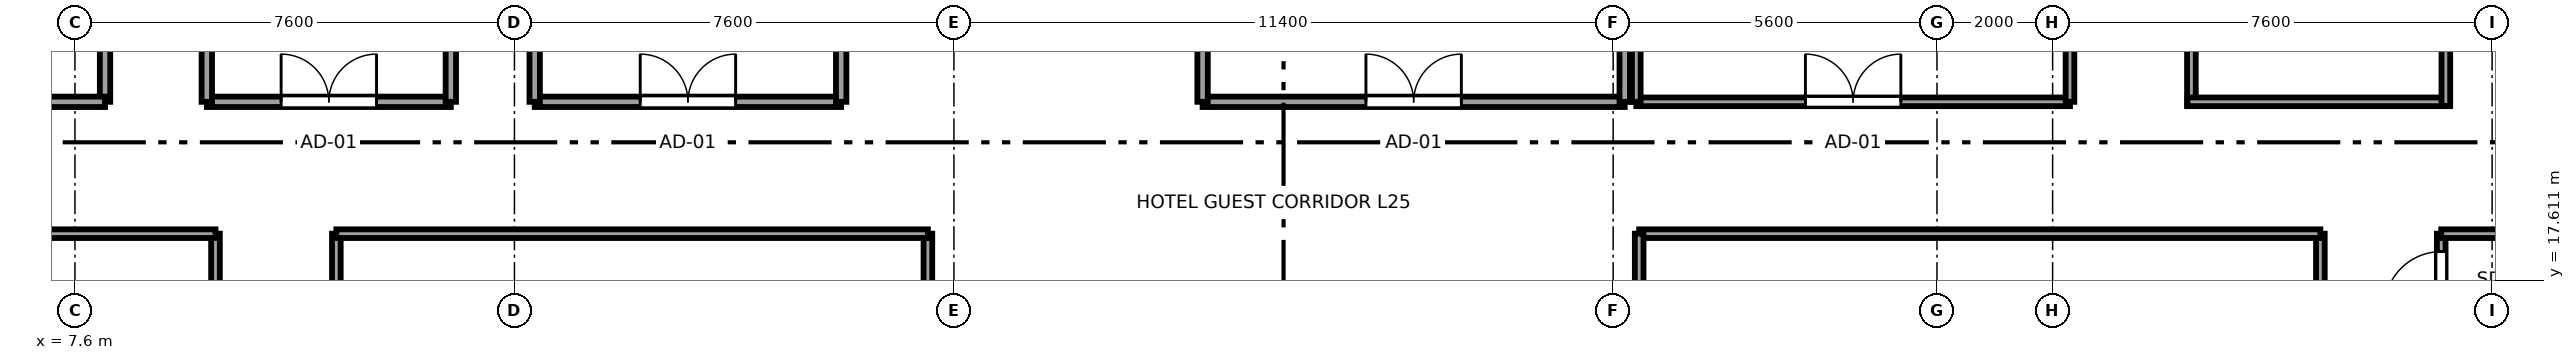
"""IFC4 building model, lengths in metres.
Left out: names, types, materials, properties, quantities, classifications, styles, units other than length and angle.
Written with IfcOpenShell. Run it as: python <this file> out.ifc"""

import sys

from ifc_helpers import new_model, si_unit, direction, frame, frame_2d, origin, place, context, subcontext, project, spatial, rectangle, extrude, source, transform, mapped, element, fill, save


model = new_model("IFC4")
c1 = context("Model", 3, precision=1e-05, world=origin(), true_north=direction((0.0, 1.0)))
c2 = subcontext(c1, "Body", "Model", "MODEL_VIEW")
j1 = project(units=[si_unit("LENGTHUNIT", "METRE"), si_unit("PLANEANGLEUNIT", "RADIAN")], contexts=[c1])
p1 = place(None, origin())
s1 = spatial("IfcSite", under=j1, at=p1, CompositionType="ELEMENT")
p2 = place(p1, origin())
s2 = spatial("IfcBuilding", under=s1, at=p2, CompositionType="ELEMENT")
p3 = place(p2, frame((0.0, 0.0, 100.9)))
s3 = spatial("IfcBuildingStorey", under=s2, at=p3, CompositionType="ELEMENT", Elevation=100.9)
p4 = place(p3, frame((10.03, 11.61, 0.0), z_axis=(0.0, 0.0, 1.0), x_axis=(0.0, 1.0, 0.0)))
e1 = element("IfcWall", 1, at=p4, inside=s3, PredefinedType="PARTITIONING", context=c2, shape_type="SweptSolid", body=[
    extrude(rectangle(XDim=6.81, YDim=0.15, at=frame_2d((3.405, 0.0))), origin(), (0.0, 0.0, 1.0), 3.37),
])
p5 = place(p4, frame((2.895, 0.0, 0.0)))
e2 = element("IfcOpeningElement", 2, at=p5, cuts=e1, PredefinedType="OPENING", context=c2, shape_type="SweptSolid", body=[
    extrude(rectangle(XDim=0.98, YDim=2.12, at=frame_2d((0.49, 1.06))), frame((0.0, 0.085, 0.0), z_axis=(0.0, -1.0, 0.0), x_axis=(1.0, 0.0, 0.0)), (0.0, 0.0, 1.0), 0.17),
])
p6 = place(p3, frame((0.3, 18.42, 0.0), z_axis=(0.0, 0.0, 1.0), x_axis=(1.0, 0.0, 0.0)))
e3 = element("IfcWall", 3, at=p6, inside=s3, PredefinedType="PARTITIONING", context=c2, shape_type="SweptSolid", body=[
    extrude(rectangle(XDim=9.73, YDim=0.15, at=frame_2d((4.865, 0.0))), origin(), (0.0, 0.0, 1.0), 3.37),
])
p7 = place(p3, frame((12.12, 14.81, 0.0), z_axis=(0.0, 0.0, 1.0), x_axis=(0.0, 1.0, 0.0)))
e4 = element("IfcWall", 4, at=p7, inside=s3, PredefinedType="PARTITIONING", context=c2, shape_type="SweptSolid", body=[
    extrude(rectangle(XDim=3.61, YDim=0.15, at=frame_2d((1.805, 0.0))), origin(), (0.0, 0.0, 1.0), 3.37),
])
p8 = place(p7, frame((1.295, 0.0, 0.0)))
e5 = element("IfcOpeningElement", 5, at=p8, cuts=e4, PredefinedType="OPENING", context=c2, shape_type="SweptSolid", body=[
    extrude(rectangle(XDim=0.98, YDim=2.12, at=frame_2d((0.49, 1.06))), frame((0.0, 0.085, 0.0), z_axis=(0.0, -1.0, 0.0), x_axis=(1.0, 0.0, 0.0)), (0.0, 0.0, 1.0), 0.17),
])
p9 = place(p3, frame((22.35, 12.48, 0.0), z_axis=(0.0, 0.0, 1.0), x_axis=(0.0, 1.0, 0.0)))
e6 = element("IfcWall", 6, at=p9, inside=s3, PredefinedType="PARTITIONING", context=c2, shape_type="SweptSolid", body=[
    extrude(rectangle(XDim=5.94, YDim=0.15, at=frame_2d((2.97, 0.0))), origin(), (0.0, 0.0, 1.0), 3.37),
])
p10 = place(p3, frame((12.12, 18.42, 0.0), z_axis=(0.0, 0.0, 1.0), x_axis=(1.0, 0.0, 0.0)))
e7 = element("IfcWall", 7, at=p10, inside=s3, PredefinedType="PARTITIONING", context=c2, shape_type="SweptSolid", body=[
    extrude(rectangle(XDim=10.23, YDim=0.15, at=frame_2d((5.115, 0.0))), origin(), (0.0, 0.0, 1.0), 3.37),
])
p11 = place(p3, frame((46.43, 11.41, 0.0), z_axis=(0.0, 0.0, 1.0), x_axis=(0.0, 1.0, 0.0)))
e8 = element("IfcWall", 8, at=p11, inside=s3, PredefinedType="PARTITIONING", context=c2, shape_type="SweptSolid", body=[
    extrude(rectangle(XDim=7.01, YDim=0.15, at=frame_2d((3.505, 0.0))), origin(), (0.0, 0.0, 1.0), 3.37),
])
p12 = place(p11, frame((2.995, 0.0, 0.0)))
e9 = element("IfcOpeningElement", 9, at=p12, cuts=e8, PredefinedType="OPENING", context=c2, shape_type="SweptSolid", body=[
    extrude(rectangle(XDim=0.98, YDim=2.12, at=frame_2d((0.49, 1.06))), frame((0.0, 0.085, 0.0), z_axis=(0.0, -1.0, 0.0), x_axis=(1.0, 0.0, 0.0)), (0.0, 0.0, 1.0), 0.17),
])
p13 = place(p3, frame((34.65, 18.42, 0.0), z_axis=(0.0, 0.0, 1.0), x_axis=(1.0, 0.0, 0.0)))
e10 = element("IfcWall", 10, at=p13, inside=s3, PredefinedType="PARTITIONING", context=c2, shape_type="SweptSolid", body=[
    extrude(rectangle(XDim=11.78, YDim=0.15, at=frame_2d((5.89, 0.0))), origin(), (0.0, 0.0, 1.0), 3.37),
])
p14 = place(p3, frame((34.65, 9.08, 0.0), z_axis=(0.0, 0.0, 1.0), x_axis=(0.0, 1.0, 0.0)))
e11 = element("IfcWall", 11, at=p14, inside=s3, PredefinedType="PARTITIONING", context=c2, shape_type="SweptSolid", body=[
    extrude(rectangle(XDim=9.34, YDim=0.15, at=frame_2d((4.67, 0.0))), origin(), (0.0, 0.0, 1.0), 3.37),
])
p15 = place(p3, frame((48.52, 14.61, 0.0), z_axis=(0.0, 0.0, 1.0), x_axis=(0.0, 1.0, 0.0)))
e12 = element("IfcWall", 12, at=p15, inside=s3, PredefinedType="PARTITIONING", context=c2, shape_type="SweptSolid", body=[
    extrude(rectangle(XDim=3.81, YDim=0.15, at=frame_2d((1.905, 0.0))), origin(), (0.0, 0.0, 1.0), 3.37),
])
p16 = place(p15, frame((2.52, 0.0, 0.0)))
e13 = element("IfcOpeningElement", 13, at=p16, cuts=e12, PredefinedType="OPENING", context=c2, shape_type="SweptSolid", body=[
    extrude(rectangle(XDim=0.98, YDim=2.12, at=frame_2d((0.49, 1.06))), frame((0.0, 0.085, 0.0), z_axis=(0.0, -1.0, 0.0), x_axis=(1.0, 0.0, 0.0)), (0.0, 0.0, 1.0), 0.17),
])
p17 = place(p3, frame((48.52, 18.42, 0.0), z_axis=(0.0, 0.0, 1.0), x_axis=(1.0, 0.0, 0.0)))
e14 = element("IfcWall", 14, at=p17, inside=s3, PredefinedType="PARTITIONING", context=c2, shape_type="SweptSolid", body=[
    extrude(rectangle(XDim=8.075, YDim=0.15, at=frame_2d((4.038, 0.0))), origin(), (0.0, 0.0, 1.0), 3.37),
])
p18 = place(p3, frame((8.12, 20.7, 0.0), z_axis=(0.0, 0.0, 1.0), x_axis=(0.0, 1.0, 0.0)))
e15 = element("IfcWall", 15, at=p18, inside=s3, PredefinedType="PARTITIONING", context=c2, shape_type="SweptSolid", body=[
    extrude(rectangle(XDim=15.1, YDim=0.18, at=frame_2d((7.55, 0.0))), origin(), (0.0, 0.0, 1.0), 3.37),
])
p19 = place(p18, frame((5.15, 0.0, 0.0)))
e16 = element("IfcOpeningElement", 16, at=p19, cuts=e15, PredefinedType="OPENING", context=c2, shape_type="SweptSolid", body=[
    extrude(rectangle(XDim=1.65, YDim=2.15, at=frame_2d((0.825, 1.075))), frame((0.0, 0.1, 0.0), z_axis=(0.0, -1.0, 0.0), x_axis=(1.0, 0.0, 0.0)), (0.0, 0.0, 1.0), 0.2),
])
p20 = place(p3, frame((0.3, 20.7, 0.0), z_axis=(0.0, 0.0, 1.0), x_axis=(1.0, 0.0, 0.0)))
e17 = element("IfcWall", 17, at=p20, inside=s3, PredefinedType="PARTITIONING", context=c2, shape_type="SweptSolid", body=[
    extrude(rectangle(XDim=7.82, YDim=0.18, at=frame_2d((3.91, 0.0))), origin(), (0.0, 0.0, 1.0), 3.37),
])
p21 = place(p3, frame((44.2, 20.63, 0.0), z_axis=(0.0, 0.0, 1.0), x_axis=(0.0, 1.0, 0.0)))
e18 = element("IfcWall", 18, at=p21, inside=s3, PredefinedType="PARTITIONING", context=c2, shape_type="SweptSolid", body=[
    extrude(rectangle(XDim=3.74, YDim=0.15, at=frame_2d((1.87, 0.0))), origin(), (0.0, 0.0, 1.0), 3.37),
])
p22 = place(p21, frame((1.24, 0.0, 0.0)))
e19 = element("IfcOpeningElement", 19, at=p22, cuts=e18, PredefinedType="OPENING", context=c2, shape_type="SweptSolid", body=[
    extrude(rectangle(XDim=0.92, YDim=2.01, at=frame_2d((0.46, 1.005))), frame((0.0, 0.085, 0.0), z_axis=(0.0, -1.0, 0.0), x_axis=(1.0, 0.0, 0.0)), (0.0, 0.0, 1.0), 0.17),
])
p23 = place(p3, frame((44.13, 20.7, 0.0), z_axis=(0.0, 0.0, 1.0), x_axis=(1.0, 0.0, 0.0)))
e20 = element("IfcWall", 20, at=p23, inside=s3, PredefinedType="PARTITIONING", context=c2, shape_type="SweptSolid", body=[
    extrude(rectangle(XDim=4.54, YDim=0.15, at=frame_2d((2.27, 0.0))), origin(), (0.0, 0.0, 1.0), 3.37),
])
p24 = place(p3, frame((48.6, 20.63, 0.0), z_axis=(0.0, 0.0, 1.0), x_axis=(0.0, 1.0, 0.0)))
e21 = element("IfcWall", 21, at=p24, inside=s3, PredefinedType="PARTITIONING", context=c2, shape_type="SweptSolid", body=[
    extrude(rectangle(XDim=3.74, YDim=0.15, at=frame_2d((1.87, 0.0))), origin(), (0.0, 0.0, 1.0), 3.37),
])
p25 = place(p3, frame((9.88, 20.7, 0.0), z_axis=(0.0, 0.0, 1.0), x_axis=(1.0, 0.0, 0.0)))
e22 = element("IfcWall", 22, at=p25, inside=s3, PredefinedType="PARTITIONING", context=c2, shape_type="SweptSolid", body=[
    extrude(rectangle(XDim=4.22, YDim=0.18, at=frame_2d((2.11, 0.0))), origin(), (0.0, 0.0, 1.0), 3.37),
])
p26 = place(p25, frame((1.285, 0.0, 0.0)))
e23 = element("IfcOpeningElement", 23, at=p26, cuts=e22, PredefinedType="OPENING", context=c2, shape_type="SweptSolid", body=[
    extrude(rectangle(XDim=1.65, YDim=2.15, at=frame_2d((0.825, 1.075))), frame((0.0, 0.1, 0.0), z_axis=(0.0, -1.0, 0.0), x_axis=(1.0, 0.0, 0.0)), (0.0, 0.0, 1.0), 0.2),
])
for number, where, z_axis, x_axis in (
    (24, (9.88, 20.7, 0.0), (0.0, 0.0, 1.0), (0.0, 1.0, 0.0)),
    (25, (14.1, 20.7, 0.0), (0.0, 0.0, 1.0), (0.0, 1.0, 0.0)),
):
    element("IfcWall", number, at=place(p3, frame(where, z_axis=z_axis, x_axis=x_axis)), inside=s3, PredefinedType="PARTITIONING", context=c2, shape_type="SweptSolid", body=[
        extrude(rectangle(XDim=9.05, YDim=0.18, at=frame_2d((4.525, 0.0))), origin(), (0.0, 0.0, 1.0), 3.37),
    ])
p27 = place(p3, frame((27.1, 20.7, 0.0), z_axis=(0.0, 0.0, 1.0), x_axis=(1.0, 0.0, 0.0)))
e26 = element("IfcWall", 26, at=p27, inside=s3, PredefinedType="PARTITIONING", context=c2, shape_type="SweptSolid", body=[
    extrude(rectangle(XDim=7.3, YDim=0.18, at=frame_2d((3.65, 0.0))), origin(), (0.0, 0.0, 1.0), 3.37),
])
p28 = place(p27, frame((2.825, 0.0, 0.0)))
e27 = element("IfcOpeningElement", 27, at=p28, cuts=e26, PredefinedType="OPENING", context=c2, shape_type="SweptSolid", body=[
    extrude(rectangle(XDim=1.65, YDim=2.15, at=frame_2d((0.825, 1.075))), frame((0.0, 0.1, 0.0), z_axis=(0.0, -1.0, 0.0), x_axis=(1.0, 0.0, 0.0)), (0.0, 0.0, 1.0), 0.2),
])
for number, where, z_axis, x_axis in (
    (28, (27.1, 20.7, 0.0), (0.0, 0.0, 1.0), (0.0, 1.0, 0.0)),
    (29, (34.4, 20.7, 0.0), (0.0, 0.0, 1.0), (0.0, 1.0, 0.0)),
):
    element("IfcWall", number, at=place(p3, frame(where, z_axis=z_axis, x_axis=x_axis)), inside=s3, PredefinedType="PARTITIONING", context=c2, shape_type="SweptSolid", body=[
        extrude(rectangle(XDim=9.1, YDim=0.18, at=frame_2d((4.55, 0.0))), origin(), (0.0, 0.0, 1.0), 3.37),
    ])
p29 = place(p3, frame((15.55, 20.7, 0.0), z_axis=(0.0, 0.0, 1.0), x_axis=(1.0, 0.0, 0.0)))
e30 = element("IfcWall", 30, at=p29, inside=s3, PredefinedType="PARTITIONING", context=c2, shape_type="SweptSolid", body=[
    extrude(rectangle(XDim=5.3, YDim=0.18, at=frame_2d((2.65, 0.0))), origin(), (0.0, 0.0, 1.0), 3.37),
])
p30 = place(p29, frame((1.825, 0.0, 0.0)))
e31 = element("IfcOpeningElement", 31, at=p30, cuts=e30, PredefinedType="OPENING", context=c2, shape_type="SweptSolid", body=[
    extrude(rectangle(XDim=1.65, YDim=2.15, at=frame_2d((0.825, 1.075))), frame((0.0, 0.1, 0.0), z_axis=(0.0, -1.0, 0.0), x_axis=(1.0, 0.0, 0.0)), (0.0, 0.0, 1.0), 0.2),
])
for number, where, z_axis, x_axis in (
    (32, (15.55, 20.7, 0.0), (0.0, 0.0, 1.0), (0.0, 1.0, 0.0)),
    (33, (20.85, 20.7, 0.0), (0.0, 0.0, 1.0), (0.0, 1.0, 0.0)),
):
    element("IfcWall", number, at=place(p3, frame(where, z_axis=z_axis, x_axis=x_axis)), inside=s3, PredefinedType="PARTITIONING", context=c2, shape_type="SweptSolid", body=[
        extrude(rectangle(XDim=9.1, YDim=0.18, at=frame_2d((4.55, 0.0))), origin(), (0.0, 0.0, 1.0), 3.37),
    ])
p31 = place(p3, frame((34.6, 20.7, 0.0), z_axis=(0.0, 0.0, 1.0), x_axis=(1.0, 0.0, 0.0)))
e34 = element("IfcWall", 34, at=p31, inside=s3, PredefinedType="PARTITIONING", context=c2, shape_type="SweptSolid", body=[
    extrude(rectangle(XDim=7.5, YDim=0.15, at=frame_2d((3.75, 0.0))), origin(), (0.0, 0.0, 1.0), 3.37),
])
p32 = place(p31, frame((2.925, 0.0, 0.0)))
e35 = element("IfcOpeningElement", 35, at=p32, cuts=e34, PredefinedType="OPENING", context=c2, shape_type="SweptSolid", body=[
    extrude(rectangle(XDim=1.65, YDim=2.15, at=frame_2d((0.825, 1.075))), frame((0.0, 0.085, 0.0), z_axis=(0.0, -1.0, 0.0), x_axis=(1.0, 0.0, 0.0)), (0.0, 0.0, 1.0), 0.17),
])
p33 = place(p3, frame((34.6, 20.7, 0.0), z_axis=(0.0, 0.0, 1.0), x_axis=(0.0, 1.0, 0.0)))
e36 = element("IfcWall", 36, at=p33, inside=s3, PredefinedType="PARTITIONING", context=c2, shape_type="SweptSolid", body=[
    extrude(rectangle(XDim=8.7, YDim=0.15, at=frame_2d((4.35, 0.0))), origin(), (0.0, 0.0, 1.0), 3.37),
])
p34 = place(p3, frame((42.1, 20.7, 0.0), z_axis=(0.0, 0.0, 1.0), x_axis=(0.0, 1.0, 0.0)))
e37 = element("IfcWall", 37, at=p34, inside=s3, PredefinedType="PARTITIONING", context=c2, shape_type="SweptSolid", body=[
    extrude(rectangle(XDim=8.7, YDim=0.15, at=frame_2d((4.35, 0.0))), origin(), (0.0, 0.0, 1.0), 2.16),
])
m1 = source(origin(), c2, "Body", "SweptSolid", [
    extrude(rectangle(XDim=0.98, YDim=2.12, at=frame_2d((0.49, 1.06))), frame((0.0, 0.025, 0.0), z_axis=(0.0, -1.0, 0.0), x_axis=(1.0, 0.0, 0.0)), (0.0, 0.0, 1.0), 0.05),
])
p35 = place(p16, origin())
e38 = element("IfcDoor", 38, at=p35, inside=s3, OperationType="SINGLE_SWING_LEFT", PredefinedType="DOOR", context=c2, shape_type="MappedRepresentation", body=[
    mapped(m1, transform((0.0, 0.0, 0.0), x_axis=(1.0, 0.0, 0.0), y_axis=(0.0, 1.0, 0.0), z_axis=(0.0, 0.0, 1.0), scale=1.0)),
])
fill(e13, e38)
m2 = source(origin(), c2, "Body", "SweptSolid", [
    extrude(rectangle(XDim=1.65, YDim=2.15, at=frame_2d((0.825, 1.075))), frame((0.0, 0.025, 0.0), z_axis=(0.0, -1.0, 0.0), x_axis=(1.0, 0.0, 0.0)), (0.0, 0.0, 1.0), 0.05),
])
p36 = place(p26, origin())
e39 = element("IfcDoor", 39, at=p36, inside=s3, OperationType="DOUBLE_DOOR_SINGLE_SWING", PredefinedType="DOOR", context=c2, shape_type="MappedRepresentation", body=[
    mapped(m2, transform((0.0, 0.0, 0.0), x_axis=(1.0, 0.0, 0.0), y_axis=(0.0, 1.0, 0.0), z_axis=(0.0, 0.0, 1.0), scale=1.0)),
])
fill(e23, e39)
p37 = place(p28, origin())
e40 = element("IfcDoor", 40, at=p37, inside=s3, OperationType="DOUBLE_DOOR_SINGLE_SWING", PredefinedType="DOOR", context=c2, shape_type="MappedRepresentation", body=[
    mapped(m2, transform((0.0, 0.0, 0.0), x_axis=(1.0, 0.0, 0.0), y_axis=(0.0, 1.0, 0.0), z_axis=(0.0, 0.0, 1.0), scale=1.0)),
])
fill(e27, e40)
p38 = place(p30, origin())
e41 = element("IfcDoor", 41, at=p38, inside=s3, OperationType="DOUBLE_DOOR_SINGLE_SWING", PredefinedType="DOOR", context=c2, shape_type="MappedRepresentation", body=[
    mapped(m2, transform((0.0, 0.0, 0.0), x_axis=(1.0, 0.0, 0.0), y_axis=(0.0, 1.0, 0.0), z_axis=(0.0, 0.0, 1.0), scale=1.0)),
])
fill(e31, e41)
p39 = place(p32, origin())
e42 = element("IfcDoor", 42, at=p39, inside=s3, OperationType="DOUBLE_DOOR_SINGLE_SWING", PredefinedType="DOOR", context=c2, shape_type="MappedRepresentation", body=[
    mapped(m2, transform((0.0, 0.0, 0.0), x_axis=(1.0, 0.0, 0.0), y_axis=(0.0, 1.0, 0.0), z_axis=(0.0, 0.0, 1.0), scale=1.0)),
])
fill(e35, e42)
save(model, sys.argv[1])
